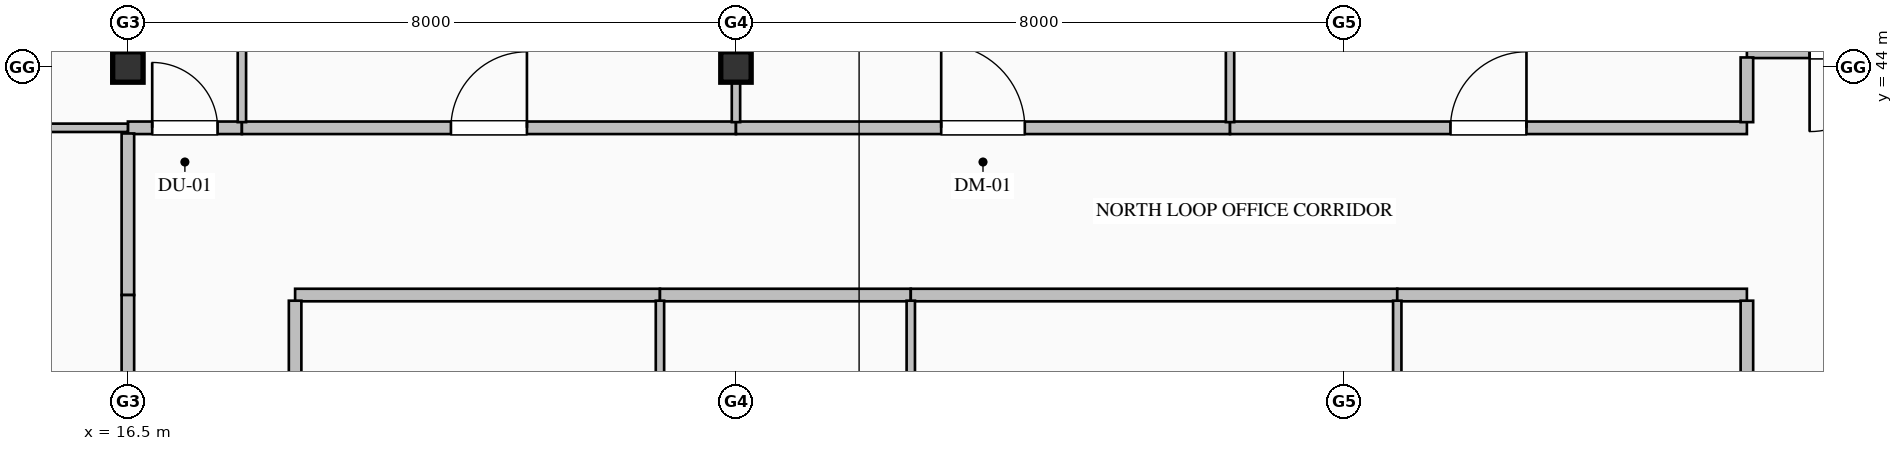
"""IFC4 building model, lengths in metres.
Left out: names, types, materials, properties, quantities, classifications, styles, units other than length and angle.
Written with IfcOpenShell. Run it as: python <this file> out.ifc"""

import sys

from ifc_helpers import new_model, si_unit, direction, frame, frame_2d, origin, origin_2d, place, context, subcontext, project, spatial, rectangle, i_section, extrude, element, fill, save


model = new_model("IFC4")
c1 = context("Model", 3, precision=1e-05, world=origin(), true_north=direction((0.0, 1.0)))
c2 = subcontext(c1, "Body", "Model", "MODEL_VIEW")
j1 = project(units=[si_unit("LENGTHUNIT", "METRE"), si_unit("PLANEANGLEUNIT", "RADIAN")], contexts=[c1])
p1 = place(None, origin())
s1 = spatial("IfcSite", under=j1, at=p1, CompositionType="ELEMENT")
p2 = place(p1, origin())
s2 = spatial("IfcBuilding", under=s1, at=p2, CompositionType="ELEMENT")
p3 = place(p2, frame((0.0, 0.0, 179.0)))
s3 = spatial("IfcBuildingStorey", under=s2, at=p3, CompositionType="ELEMENT", Elevation=179.0)
for number, where, z_axis, x_axis in (
    (1, (16.5, 44.0, 0.0), (0.0, 0.0, 1.0), (1.0, 0.0, 0.0)),
    (2, (24.5, 44.0, 0.0), (0.0, 0.0, 1.0), (1.0, 0.0, 0.0)),
):
    element("IfcColumn", number, at=place(p3, frame(where, z_axis=z_axis, x_axis=x_axis)), inside=s3, PredefinedType="COLUMN", context=c2, shape_type="SweptSolid", body=[
        extrude(i_section(OverallWidth=0.4, OverallDepth=0.4, WebThickness=0.013, FlangeThickness=0.021, FilletRadius=0.022, at=origin_2d()), origin(), (0.0, 0.0, 1.0), 4.0),
    ])
p4 = place(p3, frame((40.5, 44.2, 0.0), z_axis=(0.0, 0.0, 1.0), x_axis=(-1.0, 0.0, 0.0)))
e3 = element("IfcWall", 3, at=p4, inside=s3, PredefinedType="PARTITIONING", context=c2, shape_type="SweptSolid", body=[
    extrude(rectangle(XDim=2.7, YDim=0.165, at=frame_2d((1.35, 0.0))), origin(), (0.0, 0.0, 1.0), 3.765),
])
p5 = place(p4, frame((0.825, 0.0, 0.0)))
e4 = element("IfcOpeningElement", 4, at=p5, cuts=e3, PredefinedType="OPENING", context=c2, shape_type="SweptSolid", body=[
    extrude(rectangle(XDim=1.05, YDim=2.15, at=frame_2d((0.525, 1.075))), frame((0.0, 0.093, 0.0), z_axis=(0.0, -1.0, 0.0), x_axis=(1.0, 0.0, 0.0)), (0.0, 0.0, 1.0), 0.185),
])
p6 = place(p3, frame((16.5, 43.2, 0.0), z_axis=(0.0, 0.0, 1.0), x_axis=(1.0, 0.0, 0.0)))
e5 = element("IfcWall", 5, at=p6, inside=s3, PredefinedType="PARTITIONING", context=c2, shape_type="SweptSolid", body=[
    extrude(rectangle(XDim=1.5, YDim=0.165, at=frame_2d((0.75, 0.0))), origin(), (0.0, 0.0, 1.0), 3.765),
])
p7 = place(p6, frame((0.32, 0.0, 0.0)))
e6 = element("IfcOpeningElement", 6, at=p7, cuts=e5, PredefinedType="OPENING", context=c2, shape_type="SweptSolid", body=[
    extrude(rectangle(XDim=0.86, YDim=2.1, at=frame_2d((0.43, 1.05))), frame((0.0, 0.093, 0.0), z_axis=(0.0, -1.0, 0.0), x_axis=(1.0, 0.0, 0.0)), (0.0, 0.0, 1.0), 0.185),
])
p8 = place(p3, frame((18.0, 43.2, 0.0), z_axis=(0.0, 0.0, 1.0), x_axis=(1.0, 0.0, 0.0)))
e7 = element("IfcWall", 7, at=p8, inside=s3, PredefinedType="PARTITIONING", context=c2, shape_type="SweptSolid", body=[
    extrude(rectangle(XDim=6.5, YDim=0.165, at=frame_2d((3.25, 0.0))), origin(), (0.0, 0.0, 1.0), 3.765),
])
p9 = place(p8, frame((2.75, 0.0, 0.0)))
e8 = element("IfcOpeningElement", 8, at=p9, cuts=e7, PredefinedType="OPENING", context=c2, shape_type="SweptSolid", body=[
    extrude(rectangle(XDim=1.0, YDim=2.15, at=frame_2d((0.5, 1.075))), frame((0.0, 0.093, 0.0), z_axis=(0.0, -1.0, 0.0), x_axis=(1.0, 0.0, 0.0)), (0.0, 0.0, 1.0), 0.185),
])
p10 = place(p3, frame((24.5, 43.2, 0.0), z_axis=(0.0, 0.0, 1.0), x_axis=(1.0, 0.0, 0.0)))
e9 = element("IfcWall", 9, at=p10, inside=s3, PredefinedType="PARTITIONING", context=c2, shape_type="SweptSolid", body=[
    extrude(rectangle(XDim=6.5, YDim=0.165, at=frame_2d((3.25, 0.0))), origin(), (0.0, 0.0, 1.0), 3.765),
])
p11 = place(p10, frame((2.7, 0.0, 0.0)))
e10 = element("IfcOpeningElement", 10, at=p11, cuts=e9, PredefinedType="OPENING", context=c2, shape_type="SweptSolid", body=[
    extrude(rectangle(XDim=1.1, YDim=2.2, at=frame_2d((0.55, 1.1))), frame((0.0, 0.093, 0.0), z_axis=(0.0, -1.0, 0.0), x_axis=(1.0, 0.0, 0.0)), (0.0, 0.0, 1.0), 0.185),
])
p12 = place(p3, frame((31.0, 43.2, 0.0), z_axis=(0.0, 0.0, 1.0), x_axis=(1.0, 0.0, 0.0)))
e11 = element("IfcWall", 11, at=p12, inside=s3, PredefinedType="PARTITIONING", context=c2, shape_type="SweptSolid", body=[
    extrude(rectangle(XDim=6.8, YDim=0.165, at=frame_2d((3.4, 0.0))), origin(), (0.0, 0.0, 1.0), 3.765),
])
p13 = place(p12, frame((2.9, 0.0, 0.0)))
e12 = element("IfcOpeningElement", 12, at=p13, cuts=e11, PredefinedType="OPENING", context=c2, shape_type="SweptSolid", body=[
    extrude(rectangle(XDim=1.0, YDim=2.15, at=frame_2d((0.5, 1.075))), frame((0.0, 0.093, 0.0), z_axis=(0.0, -1.0, 0.0), x_axis=(1.0, 0.0, 0.0)), (0.0, 0.0, 1.0), 0.185),
])
p14 = place(p3, frame((23.5, 41.0, 0.0), z_axis=(0.0, 0.0, 1.0), x_axis=(-1.0, 0.0, 0.0)))
e13 = element("IfcWall", 13, at=p14, inside=s3, PredefinedType="PARTITIONING", context=c2, shape_type="SweptSolid", body=[
    extrude(rectangle(XDim=4.8, YDim=0.165, at=frame_2d((2.4, 0.0))), origin(), (0.0, 0.0, 1.0), 3.765),
])
p15 = place(p3, frame((26.8, 41.0, 0.0), z_axis=(0.0, 0.0, 1.0), x_axis=(-1.0, 0.0, 0.0)))
e14 = element("IfcWall", 14, at=p15, inside=s3, PredefinedType="PARTITIONING", context=c2, shape_type="SweptSolid", body=[
    extrude(rectangle(XDim=3.3, YDim=0.165, at=frame_2d((1.65, 0.0))), origin(), (0.0, 0.0, 1.0), 3.765),
])
p16 = place(p3, frame((33.2, 41.0, 0.0), z_axis=(0.0, 0.0, 1.0), x_axis=(-1.0, 0.0, 0.0)))
e15 = element("IfcWall", 15, at=p16, inside=s3, PredefinedType="PARTITIONING", context=c2, shape_type="SweptSolid", body=[
    extrude(rectangle(XDim=6.4, YDim=0.165, at=frame_2d((3.2, 0.0))), origin(), (0.0, 0.0, 1.0), 3.765),
])
p17 = place(p3, frame((37.8, 41.0, 0.0), z_axis=(0.0, 0.0, 1.0), x_axis=(-1.0, 0.0, 0.0)))
e16 = element("IfcWall", 16, at=p17, inside=s3, PredefinedType="PARTITIONING", context=c2, shape_type="SweptSolid", body=[
    extrude(rectangle(XDim=4.6, YDim=0.165, at=frame_2d((2.3, 0.0))), origin(), (0.0, 0.0, 1.0), 3.765),
])
p18 = place(p3, frame((16.5, 41.0, 0.0), z_axis=(0.0, 0.0, 1.0), x_axis=(0.0, 1.0, 0.0)))
e17 = element("IfcWall", 17, at=p18, inside=s3, PredefinedType="PARTITIONING", context=c2, shape_type="SweptSolid", body=[
    extrude(rectangle(XDim=2.125, YDim=0.165, at=frame_2d((1.063, 0.0))), origin(), (0.0, 0.0, 1.0), 3.157),
])
p19 = place(p3, frame((18.7, 40.926, 0.0), z_axis=(0.0, 0.0, 1.0), x_axis=(0.0, -1.0, 0.0)))
e18 = element("IfcWall", 18, at=p19, inside=s3, PredefinedType="PARTITIONING", context=c2, shape_type="SweptSolid", body=[
    extrude(rectangle(XDim=7.451, YDim=0.165, at=frame_2d((3.726, 0.0))), origin(), (0.0, 0.0, 1.0), 3.765),
])
p20 = place(p19, frame((3.226, 0.0, 0.0)))
e19 = element("IfcOpeningElement", 19, at=p20, cuts=e18, PredefinedType="OPENING", context=c2, shape_type="SweptSolid", body=[
    extrude(rectangle(XDim=1.0, YDim=2.15, at=frame_2d((0.5, 1.075))), frame((0.0, 0.093, 0.0), z_axis=(0.0, -1.0, 0.0), x_axis=(1.0, 0.0, 0.0)), (0.0, 0.0, 1.0), 0.185),
])
p21 = place(p3, frame((16.5, 33.4, 0.0), z_axis=(0.0, 0.0, 1.0), x_axis=(0.0, 1.0, 0.0)))
e20 = element("IfcWall", 20, at=p21, inside=s3, PredefinedType="PARTITIONING", context=c2, shape_type="SweptSolid", body=[
    extrude(rectangle(XDim=7.6, YDim=0.165, at=frame_2d((3.8, 0.0))), origin(), (0.0, 0.0, 1.0), 3.157),
])
p22 = place(p21, frame((3.3, 0.0, 0.0)))
e21 = element("IfcOpeningElement", 21, at=p22, cuts=e20, PredefinedType="OPENING", context=c2, shape_type="SweptSolid", body=[
    extrude(rectangle(XDim=1.0, YDim=2.15, at=frame_2d((0.5, 1.075))), frame((0.0, 0.093, 0.0), z_axis=(0.0, -1.0, 0.0), x_axis=(1.0, 0.0, 0.0)), (0.0, 0.0, 1.0), 0.185),
])
p23 = place(p3, frame((37.8, 43.274, 0.0), z_axis=(0.0, 0.0, 1.0), x_axis=(0.0, 1.0, 0.0)))
e22 = element("IfcWall", 22, at=p23, inside=s3, PredefinedType="PARTITIONING", context=c2, shape_type="SweptSolid", body=[
    extrude(rectangle(XDim=0.851, YDim=0.165, at=frame_2d((0.426, 0.0))), origin(), (0.0, 0.0, 1.0), 3.765),
])
p24 = place(p3, frame((37.8, 33.475, 0.0), z_axis=(0.0, 0.0, 1.0), x_axis=(0.0, 1.0, 0.0)))
e23 = element("IfcWall", 23, at=p24, inside=s3, PredefinedType="PARTITIONING", context=c2, shape_type="SweptSolid", body=[
    extrude(rectangle(XDim=7.451, YDim=0.165, at=frame_2d((3.726, 0.0))), origin(), (0.0, 0.0, 1.0), 3.765),
])
p25 = place(p24, frame((3.226, 0.0, 0.0)))
e24 = element("IfcOpeningElement", 24, at=p25, cuts=e23, PredefinedType="OPENING", context=c2, shape_type="SweptSolid", body=[
    extrude(rectangle(XDim=1.0, YDim=2.15, at=frame_2d((0.5, 1.075))), frame((0.0, 0.093, 0.0), z_axis=(0.0, -1.0, 0.0), x_axis=(1.0, 0.0, 0.0)), (0.0, 0.0, 1.0), 0.185),
])
p26 = place(p3, frame((18.0, 51.648, 0.0), z_axis=(0.0, 0.0, 1.0), x_axis=(0.0, -1.0, 0.0)))
e25 = element("IfcWall", 25, at=p26, inside=s3, PredefinedType="MOVABLE", context=c2, shape_type="SweptSolid", body=[
    extrude(rectangle(XDim=8.374, YDim=0.11, at=frame_2d((4.187, 0.0))), origin(), (0.0, 0.0, 1.0), 3.765),
])
p27 = place(p3, frame((16.5, 43.2, 0.0), z_axis=(0.0, 0.0, 1.0), x_axis=(-1.0, 0.0, 0.0)))
e26 = element("IfcWall", 26, at=p27, inside=s3, PredefinedType="MOVABLE", context=c2, shape_type="SweptSolid", body=[
    extrude(rectangle(XDim=5.0, YDim=0.11, at=frame_2d((2.5, 0.0))), origin(), (0.0, 0.0, 1.0), 3.765),
])
p28 = place(p3, frame((24.5, 51.648, 0.0), z_axis=(0.0, 0.0, 1.0), x_axis=(0.0, -1.0, 0.0)))
e27 = element("IfcWall", 27, at=p28, inside=s3, PredefinedType="MOVABLE", context=c2, shape_type="SweptSolid", body=[
    extrude(rectangle(XDim=8.374, YDim=0.11, at=frame_2d((4.187, 0.0))), origin(), (0.0, 0.0, 1.0), 3.157),
])
p29 = place(p3, frame((31.0, 51.648, 0.0), z_axis=(0.0, 0.0, 1.0), x_axis=(0.0, -1.0, 0.0)))
e28 = element("IfcWall", 28, at=p29, inside=s3, PredefinedType="MOVABLE", context=c2, shape_type="SweptSolid", body=[
    extrude(rectangle(XDim=8.374, YDim=0.11, at=frame_2d((4.187, 0.0))), origin(), (0.0, 0.0, 1.0), 3.765),
])
for number, where, z_axis, x_axis in (
    (29, (23.5, 40.926, 0.0), (0.0, 0.0, 1.0), (0.0, -1.0, 0.0)),
    (30, (26.8, 40.926, 0.0), (0.0, 0.0, 1.0), (0.0, -1.0, 0.0)),
    (31, (33.2, 40.926, 0.0), (0.0, 0.0, 1.0), (0.0, -1.0, 0.0)),
):
    element("IfcWall", number, at=place(p3, frame(where, z_axis=z_axis, x_axis=x_axis)), inside=s3, PredefinedType="MOVABLE", context=c2, shape_type="SweptSolid", body=[
        extrude(rectangle(XDim=7.451, YDim=0.11, at=frame_2d((3.726, 0.0))), origin(), (0.0, 0.0, 1.0), 3.765),
    ])
p30 = place(p5, origin())
e32 = element("IfcDoor", 32, at=p30, inside=s3, OperationType="SINGLE_SWING_RIGHT", PredefinedType="DOOR", context=c2, shape_type="SweptSolid", body=[
    extrude(rectangle(XDim=1.05, YDim=2.15, at=frame_2d((0.525, 1.075))), frame((0.0, 0.025, 0.0), z_axis=(0.0, -1.0, 0.0), x_axis=(1.0, 0.0, 0.0)), (0.0, 0.0, 1.0), 0.05),
])
fill(e4, e32)
p31 = place(p7, origin())
e33 = element("IfcDoor", 33, at=p31, inside=s3, OperationType="SINGLE_SWING_LEFT", PredefinedType="DOOR", context=c2, shape_type="SweptSolid", body=[
    extrude(rectangle(XDim=0.86, YDim=2.1, at=frame_2d((0.43, 1.05))), frame((0.0, 0.025, 0.0), z_axis=(0.0, -1.0, 0.0), x_axis=(1.0, 0.0, 0.0)), (0.0, 0.0, 1.0), 0.05),
])
fill(e6, e33)
p32 = place(p9, origin())
e34 = element("IfcDoor", 34, at=p32, inside=s3, OperationType="SINGLE_SWING_RIGHT", PredefinedType="DOOR", context=c2, shape_type="SweptSolid", body=[
    extrude(rectangle(XDim=1.0, YDim=2.15, at=frame_2d((0.5, 1.075))), frame((0.0, 0.025, 0.0), z_axis=(0.0, -1.0, 0.0), x_axis=(1.0, 0.0, 0.0)), (0.0, 0.0, 1.0), 0.05),
])
fill(e8, e34)
p33 = place(p11, origin())
e35 = element("IfcDoor", 35, at=p33, inside=s3, OperationType="SINGLE_SWING_LEFT", PredefinedType="DOOR", context=c2, shape_type="SweptSolid", body=[
    extrude(rectangle(XDim=1.1, YDim=2.2, at=frame_2d((0.55, 1.1))), frame((0.0, 0.025, 0.0), z_axis=(0.0, -1.0, 0.0), x_axis=(1.0, 0.0, 0.0)), (0.0, 0.0, 1.0), 0.05),
])
fill(e10, e35)
p34 = place(p13, origin())
e36 = element("IfcDoor", 36, at=p34, inside=s3, OperationType="SINGLE_SWING_RIGHT", PredefinedType="DOOR", context=c2, shape_type="SweptSolid", body=[
    extrude(rectangle(XDim=1.0, YDim=2.15, at=frame_2d((0.5, 1.075))), frame((0.0, 0.025, 0.0), z_axis=(0.0, -1.0, 0.0), x_axis=(1.0, 0.0, 0.0)), (0.0, 0.0, 1.0), 0.05),
])
fill(e12, e36)
save(model, sys.argv[1])
